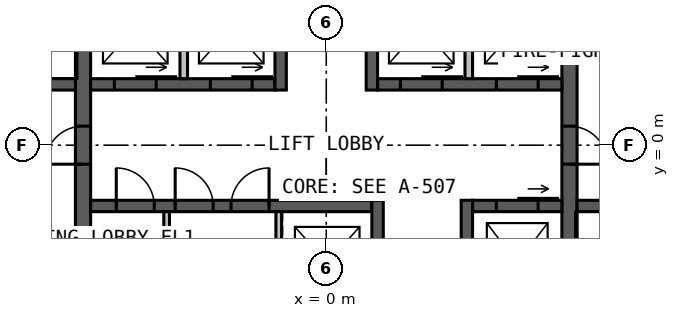
"""IFC4 building model, lengths in metres.
Left out: names, types, materials, properties, quantities, classifications, styles, units other than length and angle.
Written with IfcOpenShell. Run it as: python <this file> out.ifc"""

import sys

from ifc_helpers import new_model, si_unit, direction, frame, frame_2d, origin, place, context, subcontext, project, spatial, rectangle, extrude, element, fill, save


model = new_model("IFC4")
c1 = context("Model", 3, precision=1e-05, world=origin(), true_north=direction((0.0, 1.0)))
c2 = subcontext(c1, "Body", "Model", "MODEL_VIEW")
j1 = project(units=[si_unit("LENGTHUNIT", "METRE"), si_unit("PLANEANGLEUNIT", "RADIAN")], contexts=[c1])
p1 = place(None, origin())
s1 = spatial("IfcSite", under=j1, at=p1, CompositionType="ELEMENT")
p2 = place(p1, origin())
s2 = spatial("IfcBuilding", under=s1, at=p2, CompositionType="ELEMENT")
p3 = place(p2, frame((0.0, 0.0, 260.0)))
s3 = spatial("IfcBuildingStorey", under=s2, at=p3, CompositionType="ELEMENT", Elevation=260.0)
p4 = place(p3, frame((-6.4, -9.6, 0.0), z_axis=(0.0, 0.0, 1.0), x_axis=(0.0, 1.0, 0.0)))
e1 = element("IfcWall", 1, at=p4, inside=s3, PredefinedType="SOLIDWALL", context=c2, shape_type="SweptSolid", body=[
    extrude(rectangle(XDim=19.2, YDim=0.4, at=frame_2d((9.6, 0.0))), origin(), (0.0, 0.0, 1.0), 4.0),
])
p5 = place(p4, frame((9.1, 0.0, 0.0)))
e2 = element("IfcOpeningElement", 2, at=p5, cuts=e1, PredefinedType="OPENING", context=c2, shape_type="SweptSolid", body=[
    extrude(rectangle(XDim=1.0, YDim=2.2, at=frame_2d((0.5, 1.1))), frame((0.0, 0.21, 0.0), z_axis=(0.0, -1.0, 0.0), x_axis=(1.0, 0.0, 0.0)), (0.0, 0.0, 1.0), 0.42),
])
p6 = place(p3, frame((6.4, 9.6, 0.0), z_axis=(0.0, 0.0, 1.0), x_axis=(0.0, -1.0, 0.0)))
e3 = element("IfcWall", 3, at=p6, inside=s3, PredefinedType="SOLIDWALL", context=c2, shape_type="SweptSolid", body=[
    extrude(rectangle(XDim=19.2, YDim=0.4, at=frame_2d((9.6, 0.0))), origin(), (0.0, 0.0, 1.0), 4.0),
])
p7 = place(p6, frame((9.1, 0.0, 0.0)))
e4 = element("IfcOpeningElement", 4, at=p7, cuts=e3, PredefinedType="OPENING", context=c2, shape_type="SweptSolid", body=[
    extrude(rectangle(XDim=1.0, YDim=2.2, at=frame_2d((0.5, 1.1))), frame((0.0, 0.21, 0.0), z_axis=(0.0, -1.0, 0.0), x_axis=(1.0, 0.0, 0.0)), (0.0, 0.0, 1.0), 0.42),
])
p8 = place(p3, frame((-6.2, 1.6, 0.0), z_axis=(0.0, 0.0, 1.0), x_axis=(1.0, 0.0, 0.0)))
e5 = element("IfcWall", 5, at=p8, inside=s3, PredefinedType="SOLIDWALL", context=c2, shape_type="SweptSolid", body=[
    extrude(rectangle(XDim=4.85, YDim=0.3, at=frame_2d((2.425, 0.0))), origin(), (0.0, 0.0, 1.0), 4.0),
])
p9 = place(p8, frame((0.625, 0.0, 0.0)))
e6 = element("IfcOpeningElement", 6, at=p9, cuts=e5, PredefinedType="OPENING", context=c2, shape_type="SweptSolid", body=[
    extrude(rectangle(XDim=1.1, YDim=2.2, at=frame_2d((0.55, 1.1))), frame((0.0, 0.16, 0.0), z_axis=(0.0, -1.0, 0.0), x_axis=(1.0, 0.0, 0.0)), (0.0, 0.0, 1.0), 0.32),
])
p10 = place(p8, frame((3.15, 0.0, 0.0)))
e7 = element("IfcOpeningElement", 7, at=p10, cuts=e5, PredefinedType="OPENING", context=c2, shape_type="SweptSolid", body=[
    extrude(rectangle(XDim=1.1, YDim=2.2, at=frame_2d((0.55, 1.1))), frame((0.0, 0.16, 0.0), z_axis=(0.0, -1.0, 0.0), x_axis=(1.0, 0.0, 0.0)), (0.0, 0.0, 1.0), 0.32),
])
p11 = place(p3, frame((1.35, 1.6, 0.0), z_axis=(0.0, 0.0, 1.0), x_axis=(1.0, 0.0, 0.0)))
e8 = element("IfcWall", 8, at=p11, inside=s3, PredefinedType="SOLIDWALL", context=c2, shape_type="SweptSolid", body=[
    extrude(rectangle(XDim=4.85, YDim=0.3, at=frame_2d((2.425, 0.0))), origin(), (0.0, 0.0, 1.0), 4.0),
])
p12 = place(p11, frame((0.6, 0.0, 0.0)))
e9 = element("IfcOpeningElement", 9, at=p12, cuts=e8, PredefinedType="OPENING", context=c2, shape_type="SweptSolid", body=[
    extrude(rectangle(XDim=1.1, YDim=2.2, at=frame_2d((0.55, 1.1))), frame((0.0, 0.16, 0.0), z_axis=(0.0, -1.0, 0.0), x_axis=(1.0, 0.0, 0.0)), (0.0, 0.0, 1.0), 0.32),
])
p13 = place(p11, frame((3.125, 0.0, 0.0)))
e10 = element("IfcOpeningElement", 10, at=p13, cuts=e8, PredefinedType="OPENING", context=c2, shape_type="SweptSolid", body=[
    extrude(rectangle(XDim=1.1, YDim=2.2, at=frame_2d((0.55, 1.1))), frame((0.0, 0.16, 0.0), z_axis=(0.0, -1.0, 0.0), x_axis=(1.0, 0.0, 0.0)), (0.0, 0.0, 1.0), 0.32),
])
p14 = place(p3, frame((-1.2, 1.45, 0.0), z_axis=(0.0, 0.0, 1.0), x_axis=(0.0, 1.0, 0.0)))
e11 = element("IfcWall", 11, at=p14, inside=s3, PredefinedType="SOLIDWALL", context=c2, shape_type="SweptSolid", body=[
    extrude(rectangle(XDim=8.15, YDim=0.3, at=frame_2d((4.075, 0.0))), origin(), (0.0, 0.0, 1.0), 4.0),
])
p15 = place(p14, frame((5.05, 0.0, 0.0)))
e12 = element("IfcOpeningElement", 12, at=p15, cuts=e11, PredefinedType="OPENING", context=c2, shape_type="SweptSolid", body=[
    extrude(rectangle(XDim=1.0, YDim=2.2, at=frame_2d((0.5, 1.1))), frame((0.0, 0.16, 0.0), z_axis=(0.0, -1.0, 0.0), x_axis=(1.0, 0.0, 0.0)), (0.0, 0.0, 1.0), 0.32),
])
p16 = place(p3, frame((1.2, 1.45, 0.0), z_axis=(0.0, 0.0, 1.0), x_axis=(0.0, 1.0, 0.0)))
e13 = element("IfcWall", 13, at=p16, inside=s3, PredefinedType="SOLIDWALL", context=c2, shape_type="SweptSolid", body=[
    extrude(rectangle(XDim=8.15, YDim=0.3, at=frame_2d((4.075, 0.0))), origin(), (0.0, 0.0, 1.0), 4.0),
])
p17 = place(p16, frame((3.8, 0.0, 0.0)))
e14 = element("IfcOpeningElement", 14, at=p17, cuts=e13, PredefinedType="OPENING", context=c2, shape_type="SweptSolid", body=[
    extrude(rectangle(XDim=1.0, YDim=2.2, at=frame_2d((0.5, 1.1))), frame((0.0, 0.16, 0.0), z_axis=(0.0, -1.0, 0.0), x_axis=(1.0, 0.0, 0.0)), (0.0, 0.0, 1.0), 0.32),
])
p18 = place(p16, frame((6.15, 0.0, 0.0)))
e15 = element("IfcOpeningElement", 15, at=p18, cuts=e13, PredefinedType="OPENING", context=c2, shape_type="SweptSolid", body=[
    extrude(rectangle(XDim=1.0, YDim=2.2, at=frame_2d((0.5, 1.1))), frame((0.0, 0.16, 0.0), z_axis=(0.0, -1.0, 0.0), x_axis=(1.0, 0.0, 0.0)), (0.0, 0.0, 1.0), 0.32),
])
p19 = place(p3, frame((-6.2, -1.6, 0.0), z_axis=(0.0, 0.0, 1.0), x_axis=(1.0, 0.0, 0.0)))
e16 = element("IfcWall", 16, at=p19, inside=s3, PredefinedType="SOLIDWALL", context=c2, shape_type="SweptSolid", body=[
    extrude(rectangle(XDim=7.4, YDim=0.3, at=frame_2d((3.7, 0.0))), origin(), (0.0, 0.0, 1.0), 4.0),
])
p20 = place(p19, frame((0.675, 0.0, 0.0)))
e17 = element("IfcOpeningElement", 17, at=p20, cuts=e16, PredefinedType="OPENING", context=c2, shape_type="SweptSolid", body=[
    extrude(rectangle(XDim=1.0, YDim=2.2, at=frame_2d((0.5, 1.1))), frame((0.0, 0.16, 0.0), z_axis=(0.0, -1.0, 0.0), x_axis=(1.0, 0.0, 0.0)), (0.0, 0.0, 1.0), 0.32),
])
p21 = place(p19, frame((2.225, 0.0, 0.0)))
e18 = element("IfcOpeningElement", 18, at=p21, cuts=e16, PredefinedType="OPENING", context=c2, shape_type="SweptSolid", body=[
    extrude(rectangle(XDim=1.0, YDim=2.2, at=frame_2d((0.5, 1.1))), frame((0.0, 0.16, 0.0), z_axis=(0.0, -1.0, 0.0), x_axis=(1.0, 0.0, 0.0)), (0.0, 0.0, 1.0), 0.32),
])
p22 = place(p19, frame((3.695, 0.0, 0.0)))
e19 = element("IfcOpeningElement", 19, at=p22, cuts=e16, PredefinedType="OPENING", context=c2, shape_type="SweptSolid", body=[
    extrude(rectangle(XDim=1.0, YDim=2.2, at=frame_2d((0.5, 1.1))), frame((0.0, 0.16, 0.0), z_axis=(0.0, -1.0, 0.0), x_axis=(1.0, 0.0, 0.0)), (0.0, 0.0, 1.0), 0.32),
])
p23 = place(p3, frame((3.85, -1.6, 0.0), z_axis=(0.0, 0.0, 1.0), x_axis=(1.0, 0.0, 0.0)))
e20 = element("IfcWall", 20, at=p23, inside=s3, PredefinedType="SOLIDWALL", context=c2, shape_type="SweptSolid", body=[
    extrude(rectangle(XDim=2.35, YDim=0.3, at=frame_2d((1.175, 0.0))), origin(), (0.0, 0.0, 1.0), 4.0),
])
p24 = place(p23, frame((0.625, 0.0, 0.0)))
e21 = element("IfcOpeningElement", 21, at=p24, cuts=e20, PredefinedType="OPENING", context=c2, shape_type="SweptSolid", body=[
    extrude(rectangle(XDim=1.1, YDim=2.2, at=frame_2d((0.55, 1.1))), frame((0.0, 0.16, 0.0), z_axis=(0.0, -1.0, 0.0), x_axis=(1.0, 0.0, 0.0)), (0.0, 0.0, 1.0), 0.32),
])
p25 = place(p3, frame((1.35, -1.45, 0.0), z_axis=(0.0, 0.0, 1.0), x_axis=(0.0, -1.0, 0.0)))
e22 = element("IfcWall", 22, at=p25, inside=s3, PredefinedType="SOLIDWALL", context=c2, shape_type="SweptSolid", body=[
    extrude(rectangle(XDim=8.15, YDim=0.3, at=frame_2d((4.075, 0.0))), origin(), (0.0, 0.0, 1.0), 4.0),
])
p26 = place(p25, frame((6.0, 0.0, 0.0)))
e23 = element("IfcOpeningElement", 23, at=p26, cuts=e22, PredefinedType="OPENING", context=c2, shape_type="SweptSolid", body=[
    extrude(rectangle(XDim=1.0, YDim=2.2, at=frame_2d((0.5, 1.1))), frame((0.0, 0.16, 0.0), z_axis=(0.0, -1.0, 0.0), x_axis=(1.0, 0.0, 0.0)), (0.0, 0.0, 1.0), 0.32),
])
p27 = place(p25, frame((3.525, 0.0, 0.0)))
e24 = element("IfcOpeningElement", 24, at=p27, cuts=e22, PredefinedType="OPENING", context=c2, shape_type="SweptSolid", body=[
    extrude(rectangle(XDim=0.9, YDim=2.2, at=frame_2d((0.45, 1.1))), frame((0.0, 0.16, 0.0), z_axis=(0.0, -1.0, 0.0), x_axis=(1.0, 0.0, 0.0)), (0.0, 0.0, 1.0), 0.32),
])
p28 = place(p3, frame((3.7, -1.45, 0.0), z_axis=(0.0, 0.0, 1.0), x_axis=(0.0, -1.0, 0.0)))
e25 = element("IfcWall", 25, at=p28, inside=s3, PredefinedType="SOLIDWALL", context=c2, shape_type="SweptSolid", body=[
    extrude(rectangle(XDim=8.15, YDim=0.3, at=frame_2d((4.075, 0.0))), origin(), (0.0, 0.0, 1.0), 4.0),
])
p29 = place(p28, frame((5.1, 0.0, 0.0)))
e26 = element("IfcOpeningElement", 26, at=p29, cuts=e25, PredefinedType="OPENING", context=c2, shape_type="SweptSolid", body=[
    extrude(rectangle(XDim=0.9, YDim=2.2, at=frame_2d((0.45, 1.1))), frame((0.0, 0.16, 0.0), z_axis=(0.0, -1.0, 0.0), x_axis=(1.0, 0.0, 0.0)), (0.0, 0.0, 1.0), 0.32),
])
p30 = place(p3, frame((-9.6, 1.6, 0.0), z_axis=(0.0, 0.0, 1.0), x_axis=(1.0, 0.0, 0.0)))
e27 = element("IfcWall", 27, at=p30, inside=s3, PredefinedType="SOLIDWALL", context=c2, shape_type="SweptSolid", body=[
    extrude(rectangle(XDim=3.0, YDim=0.3, at=frame_2d((1.5, 0.0))), origin(), (0.0, 0.0, 1.0), 4.0),
])
p31 = place(p30, frame((1.0, 0.0, 0.0)))
e28 = element("IfcOpeningElement", 28, at=p31, cuts=e27, PredefinedType="OPENING", context=c2, shape_type="SweptSolid", body=[
    extrude(rectangle(XDim=1.0, YDim=2.2, at=frame_2d((0.5, 1.1))), frame((0.0, 0.16, 0.0), z_axis=(0.0, -1.0, 0.0), x_axis=(1.0, 0.0, 0.0)), (0.0, 0.0, 1.0), 0.32),
])
p32 = place(p3, frame((6.6, -1.6, 0.0), z_axis=(0.0, 0.0, 1.0), x_axis=(1.0, 0.0, 0.0)))
e29 = element("IfcWall", 29, at=p32, inside=s3, PredefinedType="SOLIDWALL", context=c2, shape_type="SweptSolid", body=[
    extrude(rectangle(XDim=3.0, YDim=0.3, at=frame_2d((1.5, 0.0))), origin(), (0.0, 0.0, 1.0), 4.0),
])
p33 = place(p32, frame((1.0, 0.0, 0.0)))
e30 = element("IfcOpeningElement", 30, at=p33, cuts=e29, PredefinedType="OPENING", context=c2, shape_type="SweptSolid", body=[
    extrude(rectangle(XDim=1.0, YDim=2.2, at=frame_2d((0.5, 1.1))), frame((0.0, 0.16, 0.0), z_axis=(0.0, -1.0, 0.0), x_axis=(1.0, 0.0, 0.0)), (0.0, 0.0, 1.0), 0.32),
])
for number, where, z_axis, x_axis in (
    (31, (-3.75, 1.75, 0.0), (0.0, 0.0, 1.0), (0.0, 1.0, 0.0)),
    (32, (3.75, 1.75, 0.0), (0.0, 0.0, 1.0), (0.0, 1.0, 0.0)),
):
    element("IfcWall", number, at=place(p3, frame(where, z_axis=z_axis, x_axis=x_axis)), inside=s3, PredefinedType="SOLIDWALL", context=c2, shape_type="SweptSolid", body=[
        extrude(rectangle(XDim=2.7, YDim=0.2, at=frame_2d((1.35, 0.0))), origin(), (0.0, 0.0, 1.0), 3.75),
    ])
for number, where, z_axis, x_axis in (
    (33, (-4.2, -1.75, 0.0), (0.0, 0.0, 1.0), (0.0, -1.0, 0.0)),
    (34, (-1.25, -1.75, 0.0), (0.0, 0.0, 1.0), (0.0, -1.0, 0.0)),
):
    element("IfcWall", number, at=place(p3, frame(where, z_axis=z_axis, x_axis=x_axis)), inside=s3, PredefinedType="PARTITIONING", context=c2, shape_type="SweptSolid", body=[
        extrude(rectangle(XDim=2.7, YDim=0.15, at=frame_2d((1.35, 0.0))), origin(), (0.0, 0.0, 1.0), 3.75),
    ])
p34 = place(p5, origin())
e35 = element("IfcDoor", 35, at=p34, inside=s3, OperationType="SINGLE_SWING_LEFT", PredefinedType="DOOR", context=c2, shape_type="SweptSolid", body=[
    extrude(rectangle(XDim=1.0, YDim=2.2, at=frame_2d((0.5, 1.1))), frame((0.0, 0.025, 0.0), z_axis=(0.0, -1.0, 0.0), x_axis=(1.0, 0.0, 0.0)), (0.0, 0.0, 1.0), 0.05),
])
fill(e2, e35)
p35 = place(p7, origin())
e36 = element("IfcDoor", 36, at=p35, inside=s3, OperationType="SINGLE_SWING_RIGHT", PredefinedType="DOOR", context=c2, shape_type="SweptSolid", body=[
    extrude(rectangle(XDim=1.0, YDim=2.2, at=frame_2d((0.5, 1.1))), frame((0.0, 0.025, 0.0), z_axis=(0.0, -1.0, 0.0), x_axis=(1.0, 0.0, 0.0)), (0.0, 0.0, 1.0), 0.05),
])
fill(e4, e36)
p36 = place(p20, origin())
e37 = element("IfcDoor", 37, at=p36, inside=s3, OperationType="SINGLE_SWING_LEFT", PredefinedType="DOOR", context=c2, shape_type="SweptSolid", body=[
    extrude(rectangle(XDim=1.0, YDim=2.2, at=frame_2d((0.5, 1.1))), frame((0.0, 0.025, 0.0), z_axis=(0.0, -1.0, 0.0), x_axis=(1.0, 0.0, 0.0)), (0.0, 0.0, 1.0), 0.05),
])
fill(e17, e37)
p37 = place(p21, origin())
e38 = element("IfcDoor", 38, at=p37, inside=s3, OperationType="SINGLE_SWING_LEFT", PredefinedType="DOOR", context=c2, shape_type="SweptSolid", body=[
    extrude(rectangle(XDim=1.0, YDim=2.2, at=frame_2d((0.5, 1.1))), frame((0.0, 0.025, 0.0), z_axis=(0.0, -1.0, 0.0), x_axis=(1.0, 0.0, 0.0)), (0.0, 0.0, 1.0), 0.05),
])
fill(e18, e38)
p38 = place(p22, origin())
e39 = element("IfcDoor", 39, at=p38, inside=s3, OperationType="SINGLE_SWING_RIGHT", PredefinedType="DOOR", context=c2, shape_type="SweptSolid", body=[
    extrude(rectangle(XDim=1.0, YDim=2.2, at=frame_2d((0.5, 1.1))), frame((0.0, 0.025, 0.0), z_axis=(0.0, -1.0, 0.0), x_axis=(1.0, 0.0, 0.0)), (0.0, 0.0, 1.0), 0.05),
])
fill(e19, e39)
p39 = place(p9, origin())
e40 = element("IfcDoor", 40, at=p39, inside=s3, OperationType="SLIDING_TO_LEFT", PredefinedType="DOOR", context=c2, shape_type="SweptSolid", body=[
    extrude(rectangle(XDim=1.1, YDim=2.2, at=frame_2d((0.55, 1.1))), frame((0.0, 0.025, 0.0), z_axis=(0.0, -1.0, 0.0), x_axis=(1.0, 0.0, 0.0)), (0.0, 0.0, 1.0), 0.05),
])
fill(e6, e40)
p40 = place(p10, origin())
e41 = element("IfcDoor", 41, at=p40, inside=s3, OperationType="SLIDING_TO_LEFT", PredefinedType="DOOR", context=c2, shape_type="SweptSolid", body=[
    extrude(rectangle(XDim=1.1, YDim=2.2, at=frame_2d((0.55, 1.1))), frame((0.0, 0.025, 0.0), z_axis=(0.0, -1.0, 0.0), x_axis=(1.0, 0.0, 0.0)), (0.0, 0.0, 1.0), 0.05),
])
fill(e7, e41)
p41 = place(p12, origin())
e42 = element("IfcDoor", 42, at=p41, inside=s3, OperationType="SLIDING_TO_LEFT", PredefinedType="DOOR", context=c2, shape_type="SweptSolid", body=[
    extrude(rectangle(XDim=1.1, YDim=2.2, at=frame_2d((0.55, 1.1))), frame((0.0, 0.025, 0.0), z_axis=(0.0, -1.0, 0.0), x_axis=(1.0, 0.0, 0.0)), (0.0, 0.0, 1.0), 0.05),
])
fill(e9, e42)
p42 = place(p13, origin())
e43 = element("IfcDoor", 43, at=p42, inside=s3, OperationType="SLIDING_TO_LEFT", PredefinedType="DOOR", context=c2, shape_type="SweptSolid", body=[
    extrude(rectangle(XDim=1.1, YDim=2.2, at=frame_2d((0.55, 1.1))), frame((0.0, 0.025, 0.0), z_axis=(0.0, -1.0, 0.0), x_axis=(1.0, 0.0, 0.0)), (0.0, 0.0, 1.0), 0.05),
])
fill(e10, e43)
p43 = place(p24, origin())
e44 = element("IfcDoor", 44, at=p43, inside=s3, OperationType="SLIDING_TO_LEFT", PredefinedType="DOOR", context=c2, shape_type="SweptSolid", body=[
    extrude(rectangle(XDim=1.1, YDim=2.2, at=frame_2d((0.55, 1.1))), frame((0.0, 0.025, 0.0), z_axis=(0.0, -1.0, 0.0), x_axis=(1.0, 0.0, 0.0)), (0.0, 0.0, 1.0), 0.05),
])
fill(e21, e44)
save(model, sys.argv[1])
